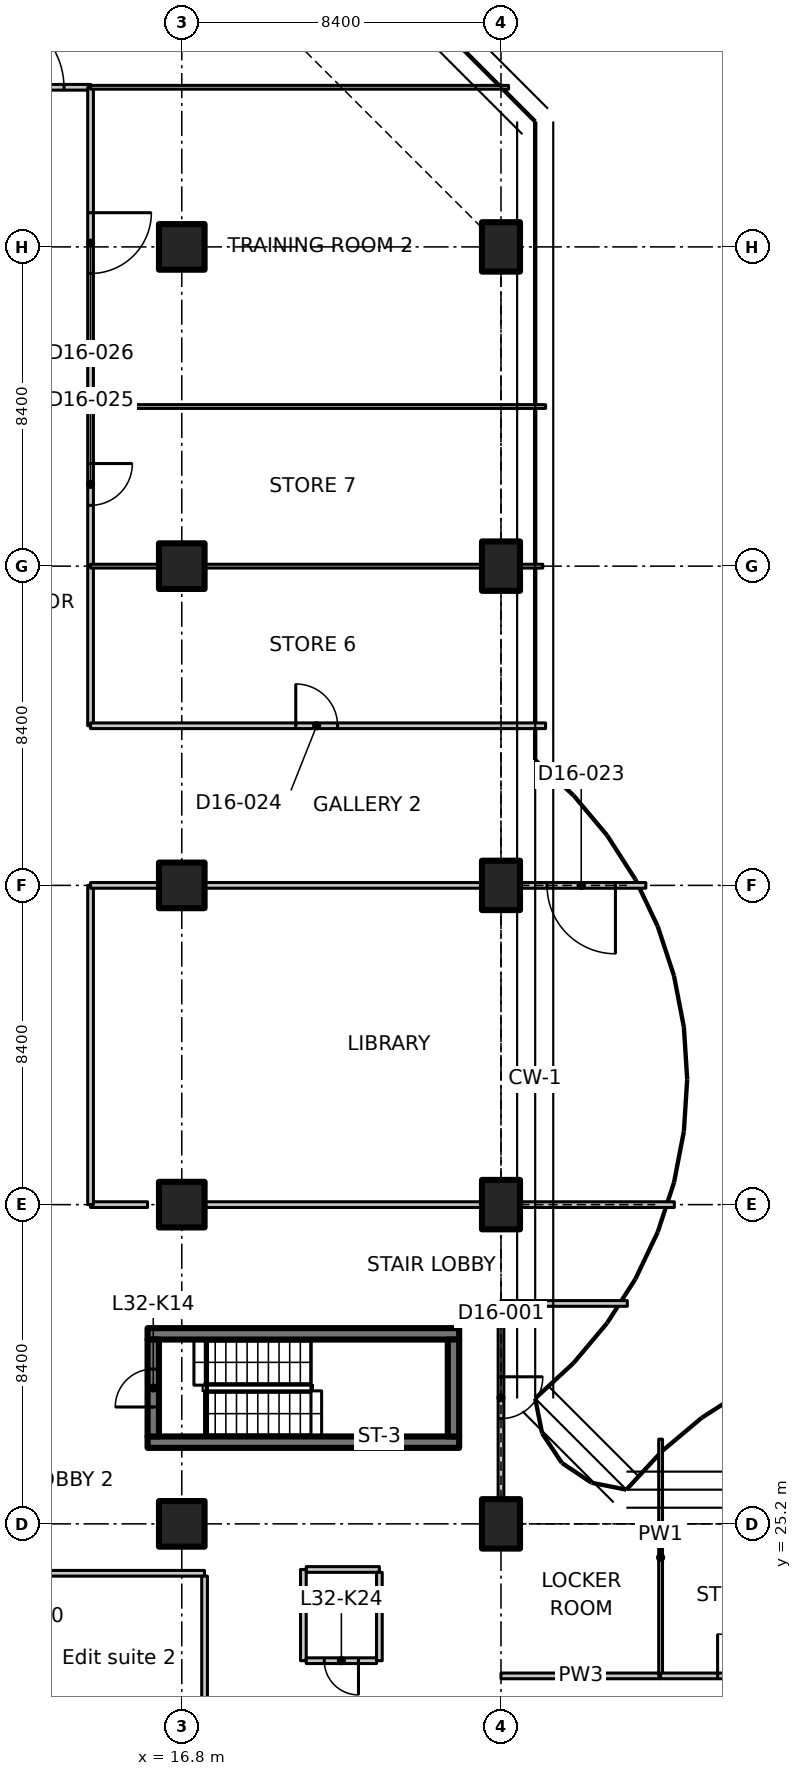
"""IFC4 building model, lengths in metres.
Left out: names, types, materials, properties, quantities, classifications, styles, units other than length and angle.
Written with IfcOpenShell. Run it as: python <this file> out.ifc"""

import sys

from ifc_helpers import new_model, si_unit, direction, frame, frame_2d, origin, origin_2d, place, context, subcontext, project, spatial, polyline, rectangle, outline, extrude, element, fill, save


model = new_model("IFC4")
c1 = context("Model", 3, precision=1e-05, world=origin(), true_north=direction((0.0, 1.0)))
c2 = subcontext(c1, "Body", "Model", "MODEL_VIEW")
j1 = project(units=[si_unit("LENGTHUNIT", "METRE"), si_unit("PLANEANGLEUNIT", "RADIAN")], contexts=[c1])
p1 = place(None, origin())
s1 = spatial("IfcSite", under=j1, at=p1, CompositionType="ELEMENT")
p2 = place(p1, origin())
s2 = spatial("IfcBuilding", under=s1, at=p2, CompositionType="ELEMENT")
p3 = place(p2, frame((0.0, 0.0, 131.3)))
s3 = spatial("IfcBuildingStorey", under=s2, at=p3, CompositionType="ELEMENT", Elevation=131.3)
for number, where, z_axis, x_axis in (
    (1, (16.8, 25.2, 0.0), (0.0, 0.0, 1.0), (1.0, 0.0, 0.0)),
    (2, (16.8, 33.6, 0.0), (0.0, 0.0, 1.0), (1.0, 0.0, 0.0)),
    (3, (16.8, 42.0, 0.0), (0.0, 0.0, 1.0), (1.0, 0.0, 0.0)),
    (4, (16.8, 50.4, 0.0), (0.0, 0.0, 1.0), (1.0, 0.0, 0.0)),
    (5, (16.8, 58.8, 0.0), (0.0, 0.0, 1.0), (1.0, 0.0, 0.0)),
):
    element("IfcColumn", number, at=place(p3, frame(where, z_axis=z_axis, x_axis=x_axis)), inside=s3, PredefinedType="COLUMN", context=c2, shape_type="SweptSolid", body=[
        extrude(rectangle(XDim=1.2, YDim=1.2, at=origin_2d()), origin(), (0.0, 0.0, 1.0), 3.35),
    ])
for number, where, z_axis, x_axis in (
    (6, (25.2, 25.2, 0.0), (0.0, 0.0, 1.0), (1.0, 0.0, 0.0)),
    (7, (25.2, 33.6, 0.0), (0.0, 0.0, 1.0), (1.0, 0.0, 0.0)),
    (8, (25.2, 42.0, 0.0), (0.0, 0.0, 1.0), (1.0, 0.0, 0.0)),
    (9, (25.2, 50.4, 0.0), (0.0, 0.0, 1.0), (1.0, 0.0, 0.0)),
    (10, (25.2, 58.8, 0.0), (0.0, 0.0, 1.0), (1.0, 0.0, 0.0)),
):
    element("IfcColumn", number, at=place(p3, frame(where, z_axis=z_axis, x_axis=x_axis)), inside=s3, PredefinedType="COLUMN", context=c2, shape_type="SweptSolid", body=[
        extrude(rectangle(XDim=1.0, YDim=1.3, at=origin_2d()), origin(), (0.0, 0.0, 1.0), 3.35),
    ])
for number, where, z_axis, x_axis in (
    (11, (15.9, 27.35, 0.0), (0.0, 0.0, 1.0), (1.0, 0.0, 0.0)),
    (12, (15.9, 30.2, 0.0), (0.0, 0.0, 1.0), (1.0, 0.0, 0.0)),
):
    element("IfcWall", number, at=place(p3, frame(where, z_axis=z_axis, x_axis=x_axis)), inside=s3, PredefinedType="SHEAR", context=c2, shape_type="SweptSolid", body=[
        extrude(rectangle(XDim=8.2, YDim=0.3, at=frame_2d((4.1, 0.0))), origin(), (0.0, 0.0, 1.0), 3.35),
    ])
p4 = place(p3, frame((16.05, 27.5, 0.0), z_axis=(0.0, 0.0, 1.0), x_axis=(0.0, 1.0, 0.0)))
e13 = element("IfcWall", 13, at=p4, inside=s3, PredefinedType="SHEAR", context=c2, shape_type="SweptSolid", body=[
    extrude(rectangle(XDim=2.55, YDim=0.3, at=frame_2d((1.275, 0.0))), origin(), (0.0, 0.0, 1.0), 3.35),
])
p5 = place(p4, frame((0.775, 0.0, 0.0)))
e14 = element("IfcOpeningElement", 14, at=p5, cuts=e13, PredefinedType="OPENING", context=c2, shape_type="SweptSolid", body=[
    extrude(rectangle(XDim=1.0, YDim=2.1, at=frame_2d((0.5, 1.05))), frame((0.0, 0.16, 0.0), z_axis=(0.0, -1.0, 0.0), x_axis=(1.0, 0.0, 0.0)), (0.0, 0.0, 1.0), 0.32),
])
p6 = place(p3, frame((23.95, 27.5, 0.0), z_axis=(0.0, 0.0, 1.0), x_axis=(0.0, 1.0, 0.0)))
e15 = element("IfcWall", 15, at=p6, inside=s3, PredefinedType="SHEAR", context=c2, shape_type="SweptSolid", body=[
    extrude(rectangle(XDim=2.55, YDim=0.3, at=frame_2d((1.275, 0.0))), origin(), (0.0, 0.0, 1.0), 3.35),
])
p7 = place(p3, frame((12.9, 23.9, 0.0), z_axis=(0.0, 0.0, 1.0), x_axis=(1.0, 0.0, 0.0)))
e16 = element("IfcWall", 16, at=p7, inside=s3, PredefinedType="PARTITIONING", context=c2, shape_type="SweptSolid", body=[
    extrude(rectangle(XDim=4.5, YDim=0.15, at=frame_2d((2.25, 0.0))), origin(), (0.0, 0.0, 1.0), 3.35),
])
p8 = place(p3, frame((17.4, 23.825, 0.0), z_axis=(0.0, 0.0, 1.0), x_axis=(0.0, -1.0, 0.0)))
e17 = element("IfcWall", 17, at=p8, inside=s3, PredefinedType="PARTITIONING", context=c2, shape_type="SweptSolid", body=[
    extrude(rectangle(XDim=4.425, YDim=0.15, at=frame_2d((2.212, 0.0))), origin(), (0.0, 0.0, 1.0), 3.35),
])
p9 = place(p3, frame((20.0, 21.6, 0.0), z_axis=(0.0, 0.0, 1.0), x_axis=(0.0, 1.0, 0.0)))
e18 = element("IfcWall", 18, at=p9, inside=s3, PredefinedType="PARTITIONING", context=c2, shape_type="SweptSolid", body=[
    extrude(rectangle(XDim=2.4, YDim=0.15, at=frame_2d((1.2, 0.0))), origin(), (0.0, 0.0, 1.0), 3.35),
])
p10 = place(p3, frame((20.075, 24.0, 0.0), z_axis=(0.0, 0.0, 1.0), x_axis=(1.0, 0.0, 0.0)))
e19 = element("IfcWall", 19, at=p10, inside=s3, PredefinedType="PARTITIONING", context=c2, shape_type="SweptSolid", body=[
    extrude(rectangle(XDim=1.925, YDim=0.15, at=frame_2d((0.962, 0.0))), origin(), (0.0, 0.0, 1.0), 3.35),
])
p11 = place(p3, frame((22.0, 23.925, 0.0), z_axis=(0.0, 0.0, 1.0), x_axis=(0.0, -1.0, 0.0)))
e20 = element("IfcWall", 20, at=p11, inside=s3, PredefinedType="PARTITIONING", context=c2, shape_type="SweptSolid", body=[
    extrude(rectangle(XDim=2.325, YDim=0.15, at=frame_2d((1.163, 0.0))), origin(), (0.0, 0.0, 1.0), 3.35),
])
p12 = place(p3, frame((21.925, 21.6, 0.0), z_axis=(0.0, 0.0, 1.0), x_axis=(-1.0, 0.0, 0.0)))
e21 = element("IfcWall", 21, at=p12, inside=s3, PredefinedType="PARTITIONING", context=c2, shape_type="SweptSolid", body=[
    extrude(rectangle(XDim=1.85, YDim=0.15, at=frame_2d((0.925, 0.0))), origin(), (0.0, 0.0, 1.0), 3.35),
])
p13 = place(p12, frame((0.475, 0.0, 0.0)))
e22 = element("IfcOpeningElement", 22, at=p13, cuts=e21, PredefinedType="OPENING", context=c2, shape_type="SweptSolid", body=[
    extrude(rectangle(XDim=0.9, YDim=2.1, at=frame_2d((0.45, 1.05))), frame((0.0, 0.085, 0.0), z_axis=(0.0, -1.0, 0.0), x_axis=(1.0, 0.0, 0.0)), (0.0, 0.0, 1.0), 0.17),
])
p14 = place(p3, frame((25.2, 21.2, 0.0), z_axis=(0.0, 0.0, 1.0), x_axis=(1.0, 0.0, 0.0)))
e23 = element("IfcWall", 23, at=p14, inside=s3, PredefinedType="PARTITIONING", context=c2, shape_type="SweptSolid", body=[
    extrude(rectangle(XDim=4.2, YDim=0.15, at=frame_2d((2.1, 0.0))), origin(), (0.0, 0.0, 1.0), 3.33),
])
p15 = place(p3, frame((29.4, 27.429, 0.0), z_axis=(0.0, 0.0, 1.0), x_axis=(0.0, -1.0, 0.0)))
e24 = element("IfcWall", 24, at=p15, inside=s3, PredefinedType="PARTITIONING", context=c2, shape_type="SweptSolid", body=[
    extrude(outline(polyline([(0.0, 0.0), (6.229, 0.0), (6.229, 3.33), (2.679, 3.33), (2.677, 2.98), (1.781, 2.98), (1.779, 3.33), (0.154, 3.33), (0.0, 3.33), (0.0, 0.0)])), frame((0.0, 0.05, 0.0), z_axis=(0.0, -1.0, 0.0), x_axis=(1.0, 0.0, 0.0)), (0.0, 0.0, 1.0), 0.1),
])
p16 = place(p3, frame((25.2, 31.0, 0.0), z_axis=(0.0, 0.0, 1.0), x_axis=(0.0, -1.0, 0.0)))
e25 = element("IfcWall", 25, at=p16, inside=s3, PredefinedType="PARTITIONING", context=c2, shape_type="SweptSolid", body=[
    extrude(outline(polyline([(0.0, 0.0), (5.13, 0.0), (5.13, 2.98), (0.0, 2.98), (0.0, 0.0)])), frame((0.0, 0.075, 0.0), z_axis=(0.0, -1.0, 0.0), x_axis=(1.0, 0.0, 0.0)), (0.0, 0.0, 1.0), 0.15),
])
p17 = place(p16, frame((1.93, 0.0, 0.0)))
e26 = element("IfcOpeningElement", 26, at=p17, cuts=e25, PredefinedType="OPENING", context=c2, shape_type="SweptSolid", body=[
    extrude(rectangle(XDim=1.1, YDim=2.1, at=frame_2d((0.55, 1.05))), frame((0.0, 0.085, 0.0), z_axis=(0.0, -1.0, 0.0), x_axis=(1.0, 0.0, 0.0)), (0.0, 0.0, 1.0), 0.17),
])
p18 = place(p3, frame((25.2, 31.0, 0.0), z_axis=(0.0, 0.0, 1.0), x_axis=(1.0, 0.0, 0.0)))
e27 = element("IfcWall", 27, at=p18, inside=s3, PredefinedType="PARTITIONING", context=c2, shape_type="SweptSolid", body=[
    extrude(rectangle(XDim=3.324, YDim=0.15, at=frame_2d((1.662, 0.0))), origin(), (0.0, 0.0, 1.0), 2.98),
])
p19 = place(p3, frame((29.4, 21.2, 0.0), z_axis=(0.0, 0.0, 1.0), x_axis=(1.0, 0.0, 0.0)))
e28 = element("IfcWall", 28, at=p19, inside=s3, PredefinedType="PARTITIONING", context=c2, shape_type="SweptSolid", body=[
    extrude(rectangle(XDim=4.2, YDim=0.15, at=frame_2d((2.1, 0.0))), origin(), (0.0, 0.0, 1.0), 3.33),
])
p20 = place(p19, frame((1.5, 0.0, 0.0)))
e29 = element("IfcOpeningElement", 29, at=p20, cuts=e28, PredefinedType="OPENING", context=c2, shape_type="SweptSolid", body=[
    extrude(rectangle(XDim=1.1, YDim=2.1, at=frame_2d((0.55, 1.05))), frame((0.0, 0.085, 0.0), z_axis=(0.0, -1.0, 0.0), x_axis=(1.0, 0.0, 0.0)), (0.0, 0.0, 1.0), 0.17),
])
p21 = place(p3, frame((14.4, 33.6, 0.0), z_axis=(0.0, 0.0, 1.0), x_axis=(1.0, 0.0, 0.0)))
e30 = element("IfcWall", 30, at=p21, inside=s3, PredefinedType="PARTITIONING", context=c2, shape_type="SweptSolid", body=[
    extrude(rectangle(XDim=1.5, YDim=0.15, at=frame_2d((0.75, 0.0))), origin(), (0.0, 0.0, 1.0), 3.33),
])
p22 = place(p3, frame((17.42, 33.6, 0.0), z_axis=(0.0, 0.0, 1.0), x_axis=(1.0, 0.0, 0.0)))
e31 = element("IfcWall", 31, at=p22, inside=s3, PredefinedType="PARTITIONING", context=c2, shape_type="SweptSolid", body=[
    extrude(rectangle(XDim=7.26, YDim=0.15, at=frame_2d((3.63, 0.0))), origin(), (0.0, 0.0, 1.0), 3.33),
])
p23 = place(p3, frame((25.72, 33.6, 0.0), z_axis=(0.0, 0.0, 1.0), x_axis=(1.0, 0.0, 0.0)))
e32 = element("IfcWall", 32, at=p23, inside=s3, PredefinedType="PARTITIONING", context=c2, shape_type="SweptSolid", body=[
    extrude(rectangle(XDim=4.042, YDim=0.15, at=frame_2d((2.021, 0.0))), origin(), (0.0, 0.0, 1.0), 2.98),
])
p24 = place(p3, frame((10.8, 63.0, 0.0), z_axis=(0.0, 0.0, 1.0), x_axis=(1.0, 0.0, 0.0)))
e33 = element("IfcWall", 33, at=p24, inside=s3, PredefinedType="PARTITIONING", context=c2, shape_type="SweptSolid", body=[
    extrude(rectangle(XDim=3.6, YDim=0.15, at=frame_2d((1.8, 0.0))), origin(), (0.0, 0.0, 1.0), 3.33),
])
p25 = place(p24, frame((0.9, 0.0, 0.0)))
e34 = element("IfcOpeningElement", 34, at=p25, cuts=e33, PredefinedType="OPENING", context=c2, shape_type="SweptSolid", body=[
    extrude(rectangle(XDim=2.0, YDim=2.4, at=frame_2d((1.0, 1.2))), frame((0.0, 0.085, 0.0), z_axis=(0.0, -1.0, 0.0), x_axis=(1.0, 0.0, 0.0)), (0.0, 0.0, 1.0), 0.17),
])
p26 = place(p3, frame((14.4, 42.0, 0.0), z_axis=(0.0, 0.0, 1.0), x_axis=(0.0, -1.0, 0.0)))
e35 = element("IfcWall", 35, at=p26, inside=s3, PredefinedType="PARTITIONING", context=c2, shape_type="SweptSolid", body=[
    extrude(rectangle(XDim=8.4, YDim=0.15, at=frame_2d((4.2, 0.0))), origin(), (0.0, 0.0, 1.0), 3.33),
])
p27 = place(p3, frame((14.4, 50.4, 0.0), z_axis=(0.0, 0.0, 1.0), x_axis=(0.0, -1.0, 0.0)))
e36 = element("IfcWall", 36, at=p27, inside=s3, PredefinedType="PARTITIONING", context=c2, shape_type="SweptSolid", body=[
    extrude(rectangle(XDim=4.2, YDim=0.15, at=frame_2d((2.1, 0.0))), origin(), (0.0, 0.0, 1.0), 3.33),
])
p28 = place(p3, frame((14.4, 54.6, 0.0), z_axis=(0.0, 0.0, 1.0), x_axis=(0.0, -1.0, 0.0)))
e37 = element("IfcWall", 37, at=p28, inside=s3, PredefinedType="PARTITIONING", context=c2, shape_type="SweptSolid", body=[
    extrude(rectangle(XDim=4.2, YDim=0.15, at=frame_2d((2.1, 0.0))), origin(), (0.0, 0.0, 1.0), 3.33),
])
p29 = place(p28, frame((1.5, 0.0, 0.0)))
e38 = element("IfcOpeningElement", 38, at=p29, cuts=e37, PredefinedType="OPENING", context=c2, shape_type="SweptSolid", body=[
    extrude(rectangle(XDim=1.1, YDim=2.1, at=frame_2d((0.55, 1.05))), frame((0.0, 0.085, 0.0), z_axis=(0.0, -1.0, 0.0), x_axis=(1.0, 0.0, 0.0)), (0.0, 0.0, 1.0), 0.17),
])
p30 = place(p3, frame((14.4, 63.0, 0.0), z_axis=(0.0, 0.0, 1.0), x_axis=(0.0, -1.0, 0.0)))
e39 = element("IfcWall", 39, at=p30, inside=s3, PredefinedType="PARTITIONING", context=c2, shape_type="SweptSolid", body=[
    extrude(rectangle(XDim=8.4, YDim=0.15, at=frame_2d((4.2, 0.0))), origin(), (0.0, 0.0, 1.0), 3.33),
])
p31 = place(p30, frame((3.3, 0.0, 0.0)))
e40 = element("IfcOpeningElement", 40, at=p31, cuts=e39, PredefinedType="OPENING", context=c2, shape_type="SweptSolid", body=[
    extrude(rectangle(XDim=1.6, YDim=2.1, at=frame_2d((0.8, 1.05))), frame((0.0, 0.085, 0.0), z_axis=(0.0, -1.0, 0.0), x_axis=(1.0, 0.0, 0.0)), (0.0, 0.0, 1.0), 0.17),
])
p32 = place(p3, frame((25.4, 63.0, 0.0), z_axis=(0.0, 0.0, 1.0), x_axis=(-1.0, 0.0, 0.0)))
e41 = element("IfcWall", 41, at=p32, inside=s3, PredefinedType="PARTITIONING", context=c2, shape_type="SweptSolid", body=[
    extrude(outline(polyline([(0.0, 0.0), (11.0, 0.0), (11.0, 3.33), (5.066, 3.33), (5.064, 2.98), (3.736, 2.98), (3.734, 3.33), (0.0, 3.33), (0.0, 0.0)])), frame((0.0, 0.05, 0.0), z_axis=(0.0, -1.0, 0.0), x_axis=(1.0, 0.0, 0.0)), (0.0, 0.0, 1.0), 0.1),
])
p33 = place(p3, frame((29.011, 42.0, 0.0), z_axis=(0.0, 0.0, 1.0), x_axis=(-1.0, 0.0, 0.0)))
e42 = element("IfcWall", 42, at=p33, inside=s3, PredefinedType="PARTITIONING", context=c2, shape_type="SweptSolid", body=[
    extrude(rectangle(XDim=3.292, YDim=0.15, at=frame_2d((1.646, 0.0))), origin(), (0.0, 0.0, 1.0), 2.98),
])
p34 = place(p33, frame((0.8, 0.0, 0.0)))
e43 = element("IfcOpeningElement", 43, at=p34, cuts=e42, PredefinedType="OPENING", context=c2, shape_type="SweptSolid", body=[
    extrude(rectangle(XDim=1.8, YDim=2.1, at=frame_2d((0.9, 1.05))), frame((0.0, 0.085, 0.0), z_axis=(0.0, -1.0, 0.0), x_axis=(1.0, 0.0, 0.0)), (0.0, 0.0, 1.0), 0.17),
])
p35 = place(p3, frame((24.68, 42.0, 0.0), z_axis=(0.0, 0.0, 1.0), x_axis=(-1.0, 0.0, 0.0)))
e44 = element("IfcWall", 44, at=p35, inside=s3, PredefinedType="PARTITIONING", context=c2, shape_type="SweptSolid", body=[
    extrude(rectangle(XDim=7.26, YDim=0.15, at=frame_2d((3.63, 0.0))), origin(), (0.0, 0.0, 1.0), 3.33),
])
p36 = place(p3, frame((16.18, 42.0, 0.0), z_axis=(0.0, 0.0, 1.0), x_axis=(-1.0, 0.0, 0.0)))
e45 = element("IfcWall", 45, at=p36, inside=s3, PredefinedType="PARTITIONING", context=c2, shape_type="SweptSolid", body=[
    extrude(rectangle(XDim=1.78, YDim=0.15, at=frame_2d((0.89, 0.0))), origin(), (0.0, 0.0, 1.0), 3.33),
])
p37 = place(p3, frame((14.4, 46.2, 0.0), z_axis=(0.0, 0.0, 1.0), x_axis=(1.0, 0.0, 0.0)))
e46 = element("IfcWall", 46, at=p37, inside=s3, PredefinedType="PARTITIONING", context=c2, shape_type="SweptSolid", body=[
    extrude(outline(polyline([(0.0, 0.0), (11.974, 0.0), (11.974, 3.33), (11.9, 3.33), (11.25, 3.33), (11.248, 2.98), (10.352, 2.98), (10.35, 3.33), (0.0, 3.33), (0.0, 0.0)])), frame((0.0, 0.075, 0.0), z_axis=(0.0, -1.0, 0.0), x_axis=(1.0, 0.0, 0.0)), (0.0, 0.0, 1.0), 0.15),
])
p38 = place(p37, frame((5.4, 0.0, 0.0)))
e47 = element("IfcOpeningElement", 47, at=p38, cuts=e46, PredefinedType="OPENING", context=c2, shape_type="SweptSolid", body=[
    extrude(rectangle(XDim=1.1, YDim=2.1, at=frame_2d((0.55, 1.05))), frame((0.0, 0.085, 0.0), z_axis=(0.0, -1.0, 0.0), x_axis=(1.0, 0.0, 0.0)), (0.0, 0.0, 1.0), 0.17),
])
p39 = place(p3, frame((14.4, 50.4, 0.0), z_axis=(0.0, 0.0, 1.0), x_axis=(1.0, 0.0, 0.0)))
e48 = element("IfcWall", 48, at=p39, inside=s3, PredefinedType="PARTITIONING", context=c2, shape_type="SweptSolid", body=[
    extrude(rectangle(XDim=1.78, YDim=0.1, at=frame_2d((0.89, 0.0))), origin(), (0.0, 0.0, 1.0), 3.33),
])
p40 = place(p3, frame((17.42, 50.4, 0.0), z_axis=(0.0, 0.0, 1.0), x_axis=(1.0, 0.0, 0.0)))
e49 = element("IfcWall", 49, at=p40, inside=s3, PredefinedType="PARTITIONING", context=c2, shape_type="SweptSolid", body=[
    extrude(rectangle(XDim=7.26, YDim=0.1, at=frame_2d((3.63, 0.0))), origin(), (0.0, 0.0, 1.0), 3.33),
])
p41 = place(p3, frame((25.72, 50.4, 0.0), z_axis=(0.0, 0.0, 1.0), x_axis=(1.0, 0.0, 0.0)))
e50 = element("IfcWall", 50, at=p41, inside=s3, PredefinedType="PARTITIONING", context=c2, shape_type="SweptSolid", body=[
    extrude(rectangle(XDim=0.58, YDim=0.1, at=frame_2d((0.29, 0.0))), origin(), (0.0, 0.0, 1.0), 3.33),
])
p42 = place(p3, frame((14.4, 54.6, 0.0), z_axis=(0.0, 0.0, 1.0), x_axis=(1.0, 0.0, 0.0)))
e51 = element("IfcWall", 51, at=p42, inside=s3, PredefinedType="PARTITIONING", context=c2, shape_type="SweptSolid", body=[
    extrude(outline(polyline([(0.0, 0.0), (11.974, 0.0), (11.974, 3.33), (11.9, 3.33), (11.25, 3.33), (11.248, 2.98), (10.352, 2.98), (10.35, 3.33), (0.0, 3.33), (0.0, 0.0)])), frame((0.0, 0.05, 0.0), z_axis=(0.0, -1.0, 0.0), x_axis=(1.0, 0.0, 0.0)), (0.0, 0.0, 1.0), 0.1),
])
p43 = place(p5, origin())
e52 = element("IfcDoor", 52, at=p43, inside=s3, OperationType="SINGLE_SWING_LEFT", PredefinedType="DOOR", context=c2, shape_type="SweptSolid", body=[
    extrude(rectangle(XDim=1.0, YDim=2.1, at=frame_2d((0.5, 1.05))), frame((0.0, 0.025, 0.0), z_axis=(0.0, -1.0, 0.0), x_axis=(1.0, 0.0, 0.0)), (0.0, 0.0, 1.0), 0.05),
])
fill(e14, e52)
p44 = place(p13, origin())
e53 = element("IfcDoor", 53, at=p44, inside=s3, OperationType="SINGLE_SWING_LEFT", PredefinedType="DOOR", context=c2, shape_type="SweptSolid", body=[
    extrude(rectangle(XDim=0.9, YDim=2.1, at=frame_2d((0.45, 1.05))), frame((0.0, 0.025, 0.0), z_axis=(0.0, -1.0, 0.0), x_axis=(1.0, 0.0, 0.0)), (0.0, 0.0, 1.0), 0.05),
])
fill(e22, e53)
p45 = place(p17, origin())
e54 = element("IfcDoor", 54, at=p45, inside=s3, OperationType="SINGLE_SWING_RIGHT", PredefinedType="DOOR", context=c2, shape_type="SweptSolid", body=[
    extrude(rectangle(XDim=1.1, YDim=2.1, at=frame_2d((0.55, 1.05))), frame((0.0, 0.025, 0.0), z_axis=(0.0, -1.0, 0.0), x_axis=(1.0, 0.0, 0.0)), (0.0, 0.0, 1.0), 0.05),
])
fill(e26, e54)
p46 = place(p20, origin())
e55 = element("IfcDoor", 55, at=p46, inside=s3, OperationType="SINGLE_SWING_LEFT", PredefinedType="DOOR", context=c2, shape_type="SweptSolid", body=[
    extrude(rectangle(XDim=1.1, YDim=2.1, at=frame_2d((0.55, 1.05))), frame((0.0, 0.025, 0.0), z_axis=(0.0, -1.0, 0.0), x_axis=(1.0, 0.0, 0.0)), (0.0, 0.0, 1.0), 0.05),
])
fill(e29, e55)
p47 = place(p25, origin())
e56 = element("IfcDoor", 56, at=p47, inside=s3, OperationType="DOUBLE_DOOR_SINGLE_SWING", PredefinedType="DOOR", context=c2, shape_type="SweptSolid", body=[
    extrude(rectangle(XDim=2.0, YDim=2.4, at=frame_2d((1.0, 1.2))), frame((0.0, 0.025, 0.0), z_axis=(0.0, -1.0, 0.0), x_axis=(1.0, 0.0, 0.0)), (0.0, 0.0, 1.0), 0.05),
])
fill(e34, e56)
p48 = place(p34, origin())
e57 = element("IfcDoor", 57, at=p48, inside=s3, OperationType="DOUBLE_DOOR_SINGLE_SWING", PredefinedType="DOOR", context=c2, shape_type="SweptSolid", body=[
    extrude(rectangle(XDim=1.8, YDim=2.1, at=frame_2d((0.9, 1.05))), frame((0.0, 0.025, 0.0), z_axis=(0.0, -1.0, 0.0), x_axis=(1.0, 0.0, 0.0)), (0.0, 0.0, 1.0), 0.05),
])
fill(e43, e57)
p49 = place(p38, origin())
e58 = element("IfcDoor", 58, at=p49, inside=s3, OperationType="SINGLE_SWING_LEFT", PredefinedType="DOOR", context=c2, shape_type="SweptSolid", body=[
    extrude(rectangle(XDim=1.1, YDim=2.1, at=frame_2d((0.55, 1.05))), frame((0.0, 0.025, 0.0), z_axis=(0.0, -1.0, 0.0), x_axis=(1.0, 0.0, 0.0)), (0.0, 0.0, 1.0), 0.05),
])
fill(e47, e58)
p50 = place(p29, origin())
e59 = element("IfcDoor", 59, at=p50, inside=s3, OperationType="SINGLE_SWING_LEFT", PredefinedType="DOOR", context=c2, shape_type="SweptSolid", body=[
    extrude(rectangle(XDim=1.1, YDim=2.1, at=frame_2d((0.55, 1.05))), frame((0.0, 0.025, 0.0), z_axis=(0.0, -1.0, 0.0), x_axis=(1.0, 0.0, 0.0)), (0.0, 0.0, 1.0), 0.05),
])
fill(e38, e59)
p51 = place(p31, origin())
e60 = element("IfcDoor", 60, at=p51, inside=s3, OperationType="DOUBLE_DOOR_SINGLE_SWING", PredefinedType="DOOR", context=c2, shape_type="SweptSolid", body=[
    extrude(rectangle(XDim=1.6, YDim=2.1, at=frame_2d((0.8, 1.05))), frame((0.0, 0.025, 0.0), z_axis=(0.0, -1.0, 0.0), x_axis=(1.0, 0.0, 0.0)), (0.0, 0.0, 1.0), 0.05),
])
fill(e40, e60)
save(model, sys.argv[1])
